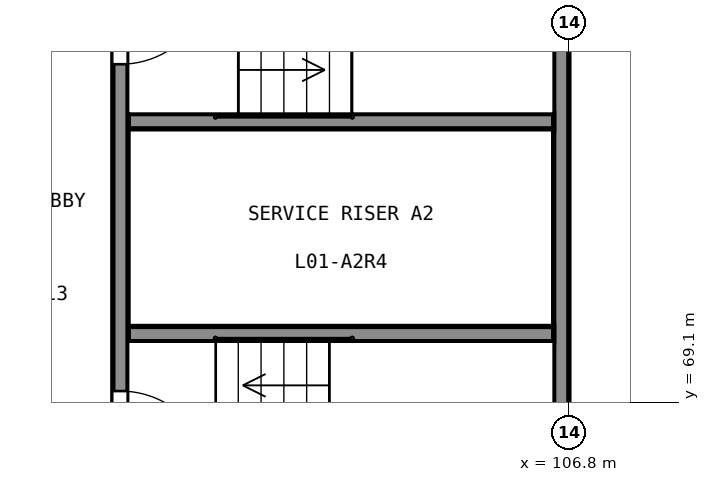
"""IFC4 building model, lengths in metres.
Left out: names, types, materials, properties, quantities, classifications, styles, units other than length and angle.
Written with IfcOpenShell. Run it as: python <this file> out.ifc"""

import sys

from ifc_helpers import new_model, si_unit, direction, frame, frame_2d, origin, place, context, subcontext, project, spatial, rectangle, extrude, element, fill, save


model = new_model("IFC4")
c1 = context("Model", 3, precision=1e-05, world=origin(), true_north=direction((0.0, 1.0)))
c2 = subcontext(c1, "Body", "Model", "MODEL_VIEW")
j1 = project(units=[si_unit("LENGTHUNIT", "METRE"), si_unit("PLANEANGLEUNIT", "RADIAN")], contexts=[c1])
p1 = place(None, origin())
s1 = spatial("IfcSite", under=j1, at=p1, CompositionType="ELEMENT")
p2 = place(p1, origin())
s2 = spatial("IfcBuilding", under=s1, at=p2, CompositionType="ELEMENT")
p3 = place(p2, frame((0.0, 0.0, 5.5)))
s3 = spatial("IfcBuildingStorey", under=s2, at=p3, CompositionType="ELEMENT", Elevation=5.5)
p4 = place(p3, frame((106.7, 67.4, 0.0), z_axis=(0.0, 0.0, 1.0), x_axis=(0.0, 1.0, 0.0)))
e1 = element("IfcWall", 1, at=p4, inside=s3, PredefinedType="SHEAR", context=c2, shape_type="SweptSolid", body=[
    extrude(rectangle(XDim=8.0, YDim=0.2, at=frame_2d((4.0, 0.0))), origin(), (0.0, 0.0, 1.0), 5.0),
])
p5 = place(p3, frame((100.9, 67.4, 0.0), z_axis=(0.0, 0.0, 1.0), x_axis=(0.0, 1.0, 0.0)))
e2 = element("IfcWall", 2, at=p5, inside=s3, PredefinedType="SHEAR", context=c2, shape_type="SweptSolid", body=[
    extrude(rectangle(XDim=8.0, YDim=0.2, at=frame_2d((4.0, 0.0))), origin(), (0.0, 0.0, 1.0), 5.0),
])
p6 = place(p5, frame((0.65, 0.0, 0.0)))
e3 = element("IfcOpeningElement", 3, at=p6, cuts=e2, PredefinedType="OPENING", context=c2, shape_type="SweptSolid", body=[
    extrude(rectangle(XDim=1.2, YDim=2.1, at=frame_2d((0.6, 1.05))), frame((0.0, 0.11, 0.0), z_axis=(0.0, -1.0, 0.0), x_axis=(1.0, 0.0, 0.0)), (0.0, 0.0, 1.0), 0.22),
])
p7 = place(p5, frame((6.15, 0.0, 0.0)))
e4 = element("IfcOpeningElement", 4, at=p7, cuts=e2, PredefinedType="OPENING", context=c2, shape_type="SweptSolid", body=[
    extrude(rectangle(XDim=1.2, YDim=2.1, at=frame_2d((0.6, 1.05))), frame((0.0, 0.11, 0.0), z_axis=(0.0, -1.0, 0.0), x_axis=(1.0, 0.0, 0.0)), (0.0, 0.0, 1.0), 0.22),
])
for number, where, z_axis, x_axis in (
    (5, (101.0, 70.0, 0.0), (0.0, 0.0, 1.0), (1.0, 0.0, 0.0)),
    (6, (101.0, 72.8, 0.0), (0.0, 0.0, 1.0), (1.0, 0.0, 0.0)),
):
    element("IfcWall", number, at=place(p3, frame(where, z_axis=z_axis, x_axis=x_axis)), inside=s3, PredefinedType="SHEAR", context=c2, shape_type="SweptSolid", body=[
        extrude(rectangle(XDim=5.6, YDim=0.2, at=frame_2d((2.8, 0.0))), origin(), (0.0, 0.0, 1.0), 5.0),
    ])
p8 = place(p6, origin())
e7 = element("IfcDoor", 7, at=p8, inside=s3, OperationType="SINGLE_SWING_LEFT", PredefinedType="DOOR", context=c2, shape_type="SweptSolid", body=[
    extrude(rectangle(XDim=1.2, YDim=2.1, at=frame_2d((0.6, 1.05))), frame((0.0, 0.025, 0.0), z_axis=(0.0, -1.0, 0.0), x_axis=(1.0, 0.0, 0.0)), (0.0, 0.0, 1.0), 0.05),
])
fill(e3, e7)
p9 = place(p7, origin())
e8 = element("IfcDoor", 8, at=p9, inside=s3, OperationType="SINGLE_SWING_RIGHT", PredefinedType="DOOR", context=c2, shape_type="SweptSolid", body=[
    extrude(rectangle(XDim=1.2, YDim=2.1, at=frame_2d((0.6, 1.05))), frame((0.0, 0.025, 0.0), z_axis=(0.0, -1.0, 0.0), x_axis=(1.0, 0.0, 0.0)), (0.0, 0.0, 1.0), 0.05),
])
fill(e4, e8)
save(model, sys.argv[1])
